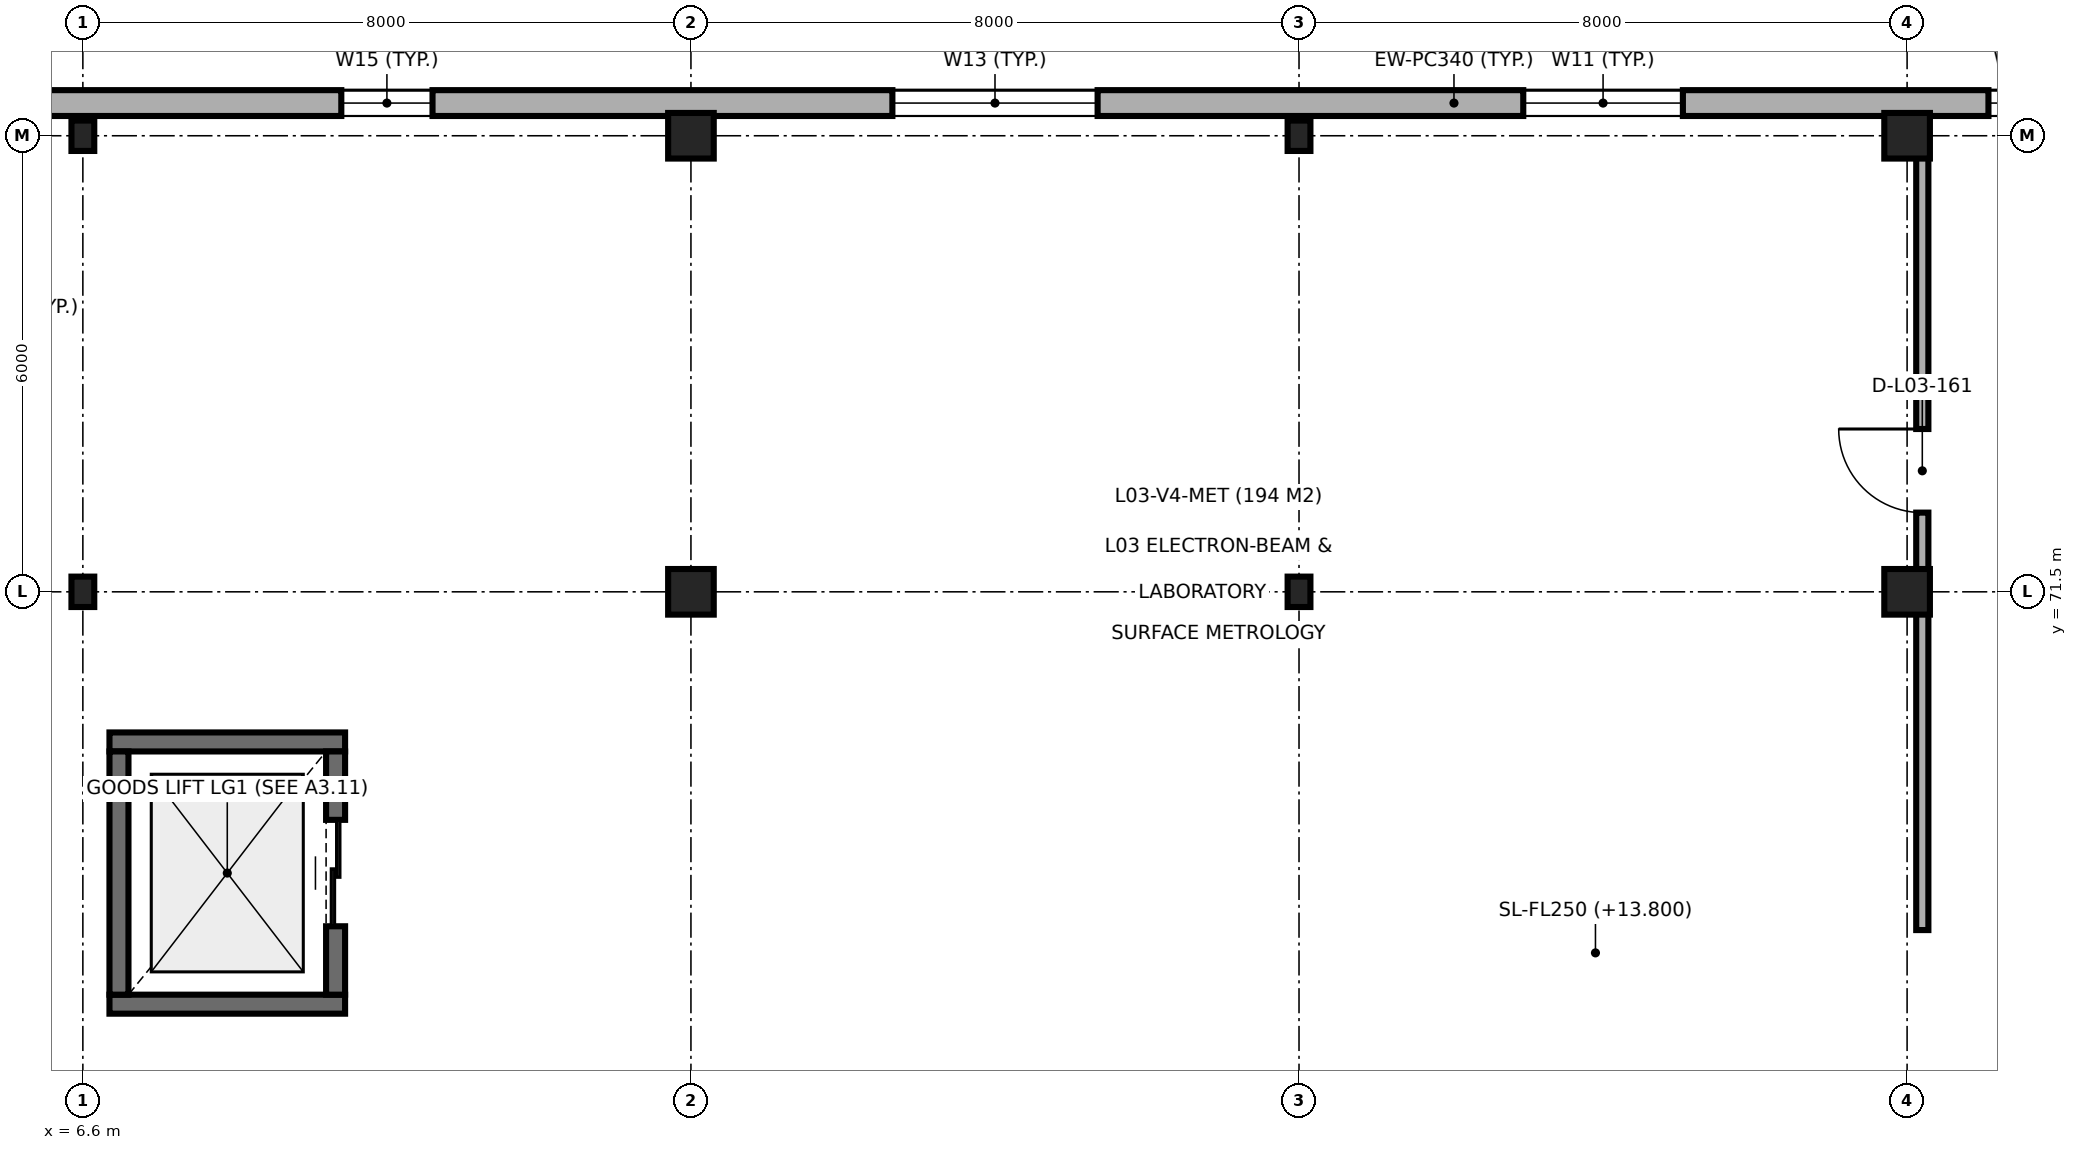
"""IFC4 building model, lengths in metres.
Left out: names, types, materials, properties, quantities, classifications, styles, units other than length and angle.
Written with IfcOpenShell. Run it as: python <this file> out.ifc"""

import sys

from ifc_helpers import new_model, si_unit, direction, frame, frame_2d, origin, origin_2d, place, context, subcontext, project, spatial, rectangle, i_section, extrude, element, fill, save


model = new_model("IFC4")
c1 = context("Model", 3, precision=1e-05, world=origin(), true_north=direction((0.0, 1.0)))
c2 = subcontext(c1, "Body", "Model", "MODEL_VIEW")
j1 = project(units=[si_unit("LENGTHUNIT", "METRE"), si_unit("PLANEANGLEUNIT", "RADIAN")], contexts=[c1])
p1 = place(None, origin())
s1 = spatial("IfcSite", under=j1, at=p1, CompositionType="ELEMENT")
p2 = place(p1, origin())
s2 = spatial("IfcBuilding", under=s1, at=p2, CompositionType="ELEMENT")
p3 = place(p2, frame((0.0, 0.0, 13.8)))
s3 = spatial("IfcBuildingStorey", under=s2, at=p3, CompositionType="ELEMENT", Elevation=13.8)
for number, where, z_axis, x_axis in (
    (1, (6.6, 71.5, 0.0), (0.0, 0.0, 1.0), (1.0, 0.0, 0.0)),
    (2, (6.6, 77.5, 0.0), (0.0, 0.0, 1.0), (1.0, 0.0, 0.0)),
):
    element("IfcColumn", number, at=place(p3, frame(where, z_axis=z_axis, x_axis=x_axis)), inside=s3, PredefinedType="COLUMN", context=c2, shape_type="SweptSolid", body=[
        extrude(i_section(OverallWidth=0.3, OverallDepth=0.4, WebThickness=0.013, FlangeThickness=0.024, FilletRadius=0.027, at=origin_2d()), origin(), (0.0, 0.0, 1.0), 4.5),
    ])
for number, where, z_axis, x_axis in (
    (3, (14.6, 71.5, 0.0), (0.0, 0.0, 1.0), (1.0, 0.0, 0.0)),
    (4, (14.6, 77.5, 0.0), (0.0, 0.0, 1.0), (1.0, 0.0, 0.0)),
):
    element("IfcColumn", number, at=place(p3, frame(where, z_axis=z_axis, x_axis=x_axis)), inside=s3, PredefinedType="COLUMN", context=c2, shape_type="SweptSolid", body=[
        extrude(rectangle(XDim=0.6, YDim=0.6, at=origin_2d()), origin(), (0.0, 0.0, 1.0), 4.5),
    ])
for number, where, z_axis, x_axis in (
    (5, (22.6, 71.5, 0.0), (0.0, 0.0, 1.0), (1.0, 0.0, 0.0)),
    (6, (22.6, 77.5, 0.0), (0.0, 0.0, 1.0), (1.0, 0.0, 0.0)),
):
    element("IfcColumn", number, at=place(p3, frame(where, z_axis=z_axis, x_axis=x_axis)), inside=s3, PredefinedType="COLUMN", context=c2, shape_type="SweptSolid", body=[
        extrude(i_section(OverallWidth=0.3, OverallDepth=0.4, WebThickness=0.013, FlangeThickness=0.024, FilletRadius=0.027, at=origin_2d()), origin(), (0.0, 0.0, 1.0), 4.5),
    ])
for number, where, z_axis, x_axis in (
    (7, (30.6, 71.5, 0.0), (0.0, 0.0, 1.0), (1.0, 0.0, 0.0)),
    (8, (30.6, 77.5, 0.0), (0.0, 0.0, 1.0), (1.0, 0.0, 0.0)),
):
    element("IfcColumn", number, at=place(p3, frame(where, z_axis=z_axis, x_axis=x_axis)), inside=s3, PredefinedType="COLUMN", context=c2, shape_type="SweptSolid", body=[
        extrude(rectangle(XDim=0.6, YDim=0.6, at=origin_2d()), origin(), (0.0, 0.0, 1.0), 4.5),
    ])
for number, where, z_axis, x_axis in (
    (9, (6.95, 66.075, 0.0), (0.0, 0.0, 1.0), (1.0, 0.0, 0.0)),
    (10, (10.05, 69.525, 0.0), (0.0, 0.0, 1.0), (-1.0, 0.0, 0.0)),
):
    element("IfcWall", number, at=place(p3, frame(where, z_axis=z_axis, x_axis=x_axis)), inside=s3, PredefinedType="SHEAR", context=c2, shape_type="SweptSolid", body=[
        extrude(rectangle(XDim=3.1, YDim=0.25, at=frame_2d((1.55, 0.0))), origin(), (0.0, 0.0, 1.0), 4.5),
    ])
p4 = place(p3, frame((7.075, 69.4, 0.0), z_axis=(0.0, 0.0, 1.0), x_axis=(0.0, -1.0, 0.0)))
e11 = element("IfcWall", 11, at=p4, inside=s3, PredefinedType="SHEAR", context=c2, shape_type="SweptSolid", body=[
    extrude(rectangle(XDim=3.2, YDim=0.25, at=frame_2d((1.6, 0.0))), origin(), (0.0, 0.0, 1.0), 4.5),
])
p5 = place(p3, frame((9.925, 66.2, 0.0), z_axis=(0.0, 0.0, 1.0), x_axis=(0.0, 1.0, 0.0)))
e12 = element("IfcWall", 12, at=p5, inside=s3, PredefinedType="SHEAR", context=c2, shape_type="SweptSolid", body=[
    extrude(rectangle(XDim=3.2, YDim=0.25, at=frame_2d((1.6, 0.0))), origin(), (0.0, 0.0, 1.0), 4.5),
])
p6 = place(p5, frame((0.9, 0.0, 0.0)))
e13 = element("IfcOpeningElement", 13, at=p6, cuts=e12, PredefinedType="OPENING", context=c2, shape_type="SweptSolid", body=[
    extrude(rectangle(XDim=1.4, YDim=2.2, at=frame_2d((0.7, 1.1))), frame((0.0, 0.135, 0.0), z_axis=(0.0, -1.0, 0.0), x_axis=(1.0, 0.0, 0.0)), (0.0, 0.0, 1.0), 0.27),
])
p7 = place(p3, frame((43.677, 77.93, 0.0), z_axis=(0.0, 0.0, 1.0), x_axis=(-1.0, 0.0, 0.0)))
e14 = element("IfcWall", 14, at=p7, inside=s3, PredefinedType="SOLIDWALL", context=c2, shape_type="SweptSolid", body=[
    extrude(rectangle(XDim=38.077, YDim=0.34, at=frame_2d((19.039, 0.0))), origin(), (0.0, 0.0, 1.0), 4.25),
])
p8 = place(p7, frame((6.277, 0.0, 0.0)))
e15 = element("IfcOpeningElement", 15, at=p8, cuts=e14, PredefinedType="OPENING", context=c2, shape_type="SweptSolid", body=[
    extrude(rectangle(XDim=1.6, YDim=2.2, at=frame_2d((0.8, 1.1))), frame((0.0, 0.18, 0.0), z_axis=(0.0, -1.0, 0.0), x_axis=(1.0, 0.0, 0.0)), (0.0, 0.0, 1.0), 0.36),
])
p9 = place(p7, frame((1.089, 0.0, 0.9)))
e16 = element("IfcOpeningElement", 16, at=p9, cuts=e14, PredefinedType="OPENING", context=c2, shape_type="SweptSolid", body=[
    extrude(rectangle(XDim=3.0, YDim=1.8, at=frame_2d((1.5, 0.9))), frame((0.0, 0.18, 0.0), z_axis=(0.0, -1.0, 0.0), x_axis=(1.0, 0.0, 0.0)), (0.0, 0.0, 1.0), 0.36),
])
p10 = place(p7, frame((10.507, 0.0, 0.9)))
e17 = element("IfcOpeningElement", 17, at=p10, cuts=e14, PredefinedType="OPENING", context=c2, shape_type="SweptSolid", body=[
    extrude(rectangle(XDim=1.5, YDim=2.1, at=frame_2d((0.75, 1.05))), frame((0.0, 0.18, 0.0), z_axis=(0.0, -1.0, 0.0), x_axis=(1.0, 0.0, 0.0)), (0.0, 0.0, 1.0), 0.36),
])
p11 = place(p7, frame((16.027, 0.0, 0.9)))
e18 = element("IfcOpeningElement", 18, at=p11, cuts=e14, PredefinedType="OPENING", context=c2, shape_type="SweptSolid", body=[
    extrude(rectangle(XDim=2.1, YDim=2.1, at=frame_2d((1.05, 1.05))), frame((0.0, 0.18, 0.0), z_axis=(0.0, -1.0, 0.0), x_axis=(1.0, 0.0, 0.0)), (0.0, 0.0, 1.0), 0.36),
])
p12 = place(p7, frame((23.727, 0.0, 0.9)))
e19 = element("IfcOpeningElement", 19, at=p12, cuts=e14, PredefinedType="OPENING", context=c2, shape_type="SweptSolid", body=[
    extrude(rectangle(XDim=2.7, YDim=2.1, at=frame_2d((1.35, 1.05))), frame((0.0, 0.18, 0.0), z_axis=(0.0, -1.0, 0.0), x_axis=(1.0, 0.0, 0.0)), (0.0, 0.0, 1.0), 0.36),
])
p13 = place(p7, frame((32.477, 0.0, 0.9)))
e20 = element("IfcOpeningElement", 20, at=p13, cuts=e14, PredefinedType="OPENING", context=c2, shape_type="SweptSolid", body=[
    extrude(rectangle(XDim=1.2, YDim=1.5, at=frame_2d((0.6, 0.75))), frame((0.0, 0.18, 0.0), z_axis=(0.0, -1.0, 0.0), x_axis=(1.0, 0.0, 0.0)), (0.0, 0.0, 1.0), 0.36),
])
p14 = place(p3, frame((30.8, 67.05, 0.0), z_axis=(0.0, 0.0, 1.0), x_axis=(0.0, 1.0, 0.0)))
e21 = element("IfcWall", 21, at=p14, inside=s3, PredefinedType="PARTITIONING", context=c2, shape_type="SweptSolid", body=[
    extrude(rectangle(XDim=4.2, YDim=0.16, at=frame_2d((2.1, 0.0))), origin(), (0.0, 0.0, 1.0), 3.85),
])
p15 = place(p3, frame((30.8, 71.75, 0.0), z_axis=(0.0, 0.0, 1.0), x_axis=(0.0, 1.0, 0.0)))
e22 = element("IfcWall", 22, at=p15, inside=s3, PredefinedType="PARTITIONING", context=c2, shape_type="SweptSolid", body=[
    extrude(rectangle(XDim=5.5, YDim=0.16, at=frame_2d((2.75, 0.0))), origin(), (0.0, 0.0, 1.0), 3.85),
])
p16 = place(p15, frame((0.792, 0.0, 0.0)))
e23 = element("IfcOpeningElement", 23, at=p16, cuts=e22, PredefinedType="OPENING", context=c2, shape_type="SweptSolid", body=[
    extrude(rectangle(XDim=1.1, YDim=2.15, at=frame_2d((0.55, 1.075))), frame((0.0, 0.09, 0.0), z_axis=(0.0, -1.0, 0.0), x_axis=(1.0, 0.0, 0.0)), (0.0, 0.0, 1.0), 0.18),
])
p17 = place(p6, origin())
e24 = element("IfcDoor", 24, at=p17, inside=s3, OperationType="DOUBLE_DOOR_SLIDING", PredefinedType="DOOR", context=c2, shape_type="SweptSolid", body=[
    extrude(rectangle(XDim=1.4, YDim=2.2, at=frame_2d((0.7, 1.1))), frame((0.0, 0.025, 0.0), z_axis=(0.0, -1.0, 0.0), x_axis=(1.0, 0.0, 0.0)), (0.0, 0.0, 1.0), 0.05),
])
fill(e13, e24)
p18 = place(p10, origin())
e25 = element("IfcWindow", 25, at=p18, inside=s3, PartitioningType="SINGLE_PANEL", PredefinedType="WINDOW", context=c2, shape_type="SweptSolid", body=[
    extrude(rectangle(XDim=1.5, YDim=2.1, at=frame_2d((0.75, 1.05))), frame((0.0, 0.03, 0.0), z_axis=(0.0, -1.0, 0.0), x_axis=(1.0, 0.0, 0.0)), (0.0, 0.0, 1.0), 0.06),
])
fill(e17, e25)
p19 = place(p11, origin())
e26 = element("IfcWindow", 26, at=p19, inside=s3, PartitioningType="SINGLE_PANEL", PredefinedType="WINDOW", context=c2, shape_type="SweptSolid", body=[
    extrude(rectangle(XDim=2.1, YDim=2.1, at=frame_2d((1.05, 1.05))), frame((0.0, 0.03, 0.0), z_axis=(0.0, -1.0, 0.0), x_axis=(1.0, 0.0, 0.0)), (0.0, 0.0, 1.0), 0.06),
])
fill(e18, e26)
p20 = place(p12, origin())
e27 = element("IfcWindow", 27, at=p20, inside=s3, PartitioningType="SINGLE_PANEL", PredefinedType="WINDOW", context=c2, shape_type="SweptSolid", body=[
    extrude(rectangle(XDim=2.7, YDim=2.1, at=frame_2d((1.35, 1.05))), frame((0.0, 0.03, 0.0), z_axis=(0.0, -1.0, 0.0), x_axis=(1.0, 0.0, 0.0)), (0.0, 0.0, 1.0), 0.06),
])
fill(e19, e27)
p21 = place(p13, origin())
e28 = element("IfcWindow", 28, at=p21, inside=s3, PartitioningType="SINGLE_PANEL", PredefinedType="WINDOW", context=c2, shape_type="SweptSolid", body=[
    extrude(rectangle(XDim=1.2, YDim=1.5, at=frame_2d((0.6, 0.75))), frame((0.0, 0.03, 0.0), z_axis=(0.0, -1.0, 0.0), x_axis=(1.0, 0.0, 0.0)), (0.0, 0.0, 1.0), 0.06),
])
fill(e20, e28)
p22 = place(p16, origin())
e29 = element("IfcDoor", 29, at=p22, inside=s3, OperationType="SINGLE_SWING_RIGHT", PredefinedType="DOOR", context=c2, shape_type="SweptSolid", body=[
    extrude(rectangle(XDim=1.1, YDim=2.15, at=frame_2d((0.55, 1.075))), frame((0.0, 0.025, 0.0), z_axis=(0.0, -1.0, 0.0), x_axis=(1.0, 0.0, 0.0)), (0.0, 0.0, 1.0), 0.05),
])
fill(e23, e29)
save(model, sys.argv[1])
